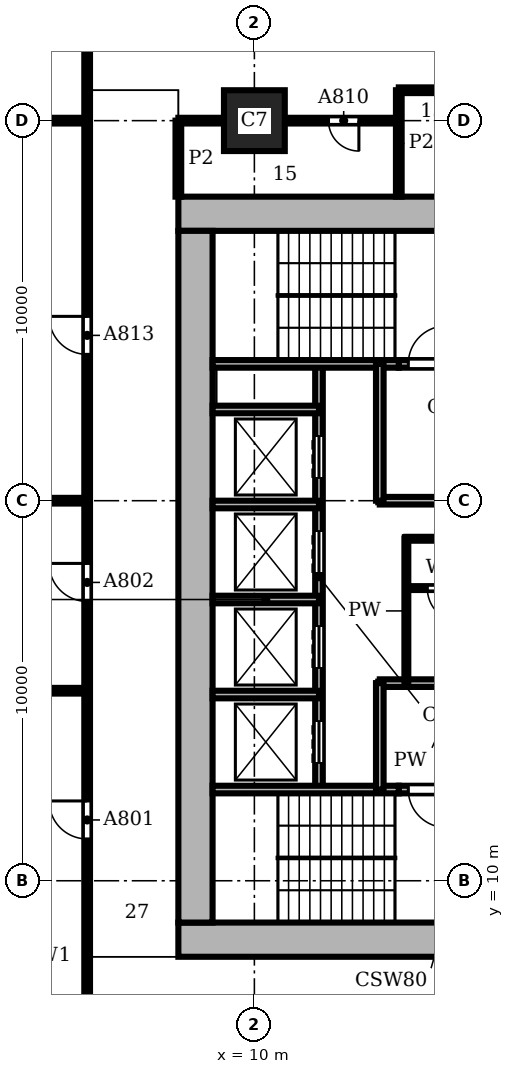
"""IFC4 building model, lengths in metres.
Left out: names, types, materials, properties, quantities, classifications, styles, units other than length and angle.
Written with IfcOpenShell. Run it as: python <this file> out.ifc"""

import sys

from ifc_helpers import new_model, si_unit, direction, frame, frame_2d, origin, origin_2d, place, context, subcontext, project, spatial, rectangle, extrude, element, fill, save


model = new_model("IFC4")
c1 = context("Model", 3, precision=1e-05, world=origin(), true_north=direction((0.0, 1.0)))
c2 = subcontext(c1, "Body", "Model", "MODEL_VIEW")
j1 = project(units=[si_unit("LENGTHUNIT", "METRE"), si_unit("PLANEANGLEUNIT", "RADIAN")], contexts=[c1])
p1 = place(None, origin())
s1 = spatial("IfcSite", under=j1, at=p1, CompositionType="ELEMENT")
p2 = place(p1, origin())
s2 = spatial("IfcBuilding", under=s1, at=p2, CompositionType="ELEMENT")
p3 = place(p2, frame((0.0, 0.0, 93.9)))
s3 = spatial("IfcBuildingStorey", under=s2, at=p3, CompositionType="ELEMENT", Elevation=93.9)
p4 = place(p3, frame((10.0, 30.0, 0.0), z_axis=(0.0, 0.0, 1.0), x_axis=(1.0, 0.0, 0.0)))
e1 = element("IfcColumn", 1, at=p4, inside=s3, PredefinedType="COLUMN", context=c2, shape_type="SweptSolid", body=[
    extrude(rectangle(XDim=1.6, YDim=1.6, at=origin_2d()), origin(), (0.0, 0.0, 1.0), 3.9),
])
for number, where, z_axis, x_axis in (
    (2, (8.0, 8.45, 0.0), (0.0, 0.0, 1.0), (1.0, 0.0, 0.0)),
    (3, (28.0, 27.55, 0.0), (0.0, 0.0, 1.0), (-1.0, 0.0, 0.0)),
):
    element("IfcWall", number, at=place(p3, frame(where, z_axis=z_axis, x_axis=x_axis)), inside=s3, PredefinedType="SHEAR", context=c2, shape_type="SweptSolid", body=[
        extrude(rectangle(XDim=20.0, YDim=0.9, at=frame_2d((10.0, 0.0))), origin(), (0.0, 0.0, 1.0), 3.9),
    ])
p5 = place(p3, frame((8.45, 27.1, 0.0), z_axis=(0.0, 0.0, 1.0), x_axis=(0.0, -1.0, 0.0)))
e4 = element("IfcWall", 4, at=p5, inside=s3, PredefinedType="SHEAR", context=c2, shape_type="SweptSolid", body=[
    extrude(rectangle(XDim=18.2, YDim=0.9, at=frame_2d((9.1, 0.0))), origin(), (0.0, 0.0, 1.0), 3.9),
])
p6 = place(p3, frame((2.532, 8.878, 0.0), z_axis=(0.0, 0.0, 1.0), x_axis=(0.608759824817, -0.793354571229, 0.0)))
e5 = element("IfcWall", 5, at=p6, inside=s3, PredefinedType="SOLIDWALL", context=c2, shape_type="SweptSolid", body=[
    extrude(rectangle(XDim=4.121, YDim=0.4, at=frame_2d((2.061, 0.0))), origin(), (0.0, 0.0, 1.0), 3.9),
])
p7 = place(p6, frame((1.611, 0.0, 0.9)))
e6 = element("IfcOpeningElement", 6, at=p7, cuts=e5, PredefinedType="OPENING", context=c2, shape_type="SweptSolid", body=[
    extrude(rectangle(XDim=0.9, YDim=2.35, at=frame_2d((0.45, 1.175))), frame((0.0, 0.21, 0.0), z_axis=(0.0, -1.0, 0.0), x_axis=(1.0, 0.0, 0.0)), (0.0, 0.0, 1.0), 0.42),
])
p8 = place(p3, frame((8.9, 12.4, 0.0), z_axis=(0.0, 0.0, 1.0), x_axis=(1.0, 0.0, 0.0)))
e7 = element("IfcWall", 7, at=p8, inside=s3, PredefinedType="SHEAR", context=c2, shape_type="SweptSolid", body=[
    extrude(rectangle(XDim=4.9, YDim=0.2, at=frame_2d((2.45, 0.0))), origin(), (0.0, 0.0, 1.0), 3.58),
])
p9 = place(p3, frame((13.8, 12.4, 0.0), z_axis=(0.0, 0.0, 1.0), x_axis=(1.0, 0.0, 0.0)))
e8 = element("IfcWall", 8, at=p9, inside=s3, PredefinedType="SHEAR", context=c2, shape_type="SweptSolid", body=[
    extrude(rectangle(XDim=13.3, YDim=0.2, at=frame_2d((6.65, 0.0))), origin(), (0.0, 0.0, 1.0), 3.58),
])
p10 = place(p9, frame((2.4, 0.0, 0.0)))
e9 = element("IfcOpeningElement", 9, at=p10, cuts=e8, PredefinedType="OPENING", context=c2, shape_type="SweptSolid", body=[
    extrude(rectangle(XDim=1.1, YDim=2.1, at=frame_2d((0.55, 1.05))), frame((0.0, 0.11, 0.0), z_axis=(0.0, -1.0, 0.0), x_axis=(1.0, 0.0, 0.0)), (0.0, 0.0, 1.0), 0.22),
])
p11 = place(p9, frame((4.9, 0.0, 0.0)))
e10 = element("IfcOpeningElement", 10, at=p11, cuts=e8, PredefinedType="OPENING", context=c2, shape_type="SweptSolid", body=[
    extrude(rectangle(XDim=1.1, YDim=2.1, at=frame_2d((0.55, 1.05))), frame((0.0, 0.11, 0.0), z_axis=(0.0, -1.0, 0.0), x_axis=(1.0, 0.0, 0.0)), (0.0, 0.0, 1.0), 0.22),
])
p12 = place(p9, frame((0.25, 0.0, 0.0)))
e11 = element("IfcOpeningElement", 11, at=p12, cuts=e8, PredefinedType="OPENING", context=c2, shape_type="SweptSolid", body=[
    extrude(rectangle(XDim=1.0, YDim=2.1, at=frame_2d((0.5, 1.05))), frame((0.0, 0.11, 0.0), z_axis=(0.0, -1.0, 0.0), x_axis=(1.0, 0.0, 0.0)), (0.0, 0.0, 1.0), 0.22),
])
p13 = place(p3, frame((8.9, 14.9, 0.0), z_axis=(0.0, 0.0, 1.0), x_axis=(1.0, 0.0, 0.0)))
e12 = element("IfcWall", 12, at=p13, inside=s3, PredefinedType="SHEAR", context=c2, shape_type="SweptSolid", body=[
    extrude(rectangle(XDim=2.8, YDim=0.2, at=frame_2d((1.4, 0.0))), origin(), (0.0, 0.0, 1.0), 3.58),
])
p14 = place(p3, frame((13.3, 15.2, 0.0), z_axis=(0.0, 0.0, 1.0), x_axis=(1.0, 0.0, 0.0)))
e13 = element("IfcWall", 13, at=p14, inside=s3, PredefinedType="SHEAR", context=c2, shape_type="SweptSolid", body=[
    extrude(rectangle(XDim=9.7, YDim=0.2, at=frame_2d((4.85, 0.0))), origin(), (0.0, 0.0, 1.0), 3.58),
])
p15 = place(p3, frame((8.9, 17.4, 0.0), z_axis=(0.0, 0.0, 1.0), x_axis=(1.0, 0.0, 0.0)))
e14 = element("IfcWall", 14, at=p15, inside=s3, PredefinedType="SHEAR", context=c2, shape_type="SweptSolid", body=[
    extrude(rectangle(XDim=2.8, YDim=0.2, at=frame_2d((1.4, 0.0))), origin(), (0.0, 0.0, 1.0), 3.58),
])
p16 = place(p3, frame((14.0, 17.7, 0.0), z_axis=(0.0, 0.0, 1.0), x_axis=(1.0, 0.0, 0.0)))
e15 = element("IfcWall", 15, at=p16, inside=s3, PredefinedType="PARTITIONING", context=c2, shape_type="SweptSolid", body=[
    extrude(rectangle(XDim=6.8, YDim=0.1, at=frame_2d((3.4, 0.0))), origin(), (0.0, 0.0, 1.0), 3.58),
])
p17 = place(p16, frame((0.55, 0.0, 0.0)))
e16 = element("IfcOpeningElement", 16, at=p17, cuts=e15, PredefinedType="OPENING", context=c2, shape_type="SweptSolid", body=[
    extrude(rectangle(XDim=0.9, YDim=2.1, at=frame_2d((0.45, 1.05))), frame((0.0, 0.06, 0.0), z_axis=(0.0, -1.0, 0.0), x_axis=(1.0, 0.0, 0.0)), (0.0, 0.0, 1.0), 0.12),
])
p18 = place(p16, frame((2.55, 0.0, 0.0)))
e17 = element("IfcOpeningElement", 17, at=p18, cuts=e15, PredefinedType="OPENING", context=c2, shape_type="SweptSolid", body=[
    extrude(rectangle(XDim=0.9, YDim=2.1, at=frame_2d((0.45, 1.05))), frame((0.0, 0.06, 0.0), z_axis=(0.0, -1.0, 0.0), x_axis=(1.0, 0.0, 0.0)), (0.0, 0.0, 1.0), 0.12),
])
p19 = place(p16, frame((4.45, 0.0, 0.0)))
e18 = element("IfcOpeningElement", 18, at=p19, cuts=e15, PredefinedType="OPENING", context=c2, shape_type="SweptSolid", body=[
    extrude(rectangle(XDim=0.9, YDim=2.1, at=frame_2d((0.45, 1.05))), frame((0.0, 0.06, 0.0), z_axis=(0.0, -1.0, 0.0), x_axis=(1.0, 0.0, 0.0)), (0.0, 0.0, 1.0), 0.12),
])
p20 = place(p16, frame((5.95, 0.0, 0.0)))
e19 = element("IfcOpeningElement", 19, at=p20, cuts=e15, PredefinedType="OPENING", context=c2, shape_type="SweptSolid", body=[
    extrude(rectangle(XDim=0.7, YDim=2.1, at=frame_2d((0.35, 1.05))), frame((0.0, 0.06, 0.0), z_axis=(0.0, -1.0, 0.0), x_axis=(1.0, 0.0, 0.0)), (0.0, 0.0, 1.0), 0.12),
])
p21 = place(p3, frame((14.0, 19.0, 0.0), z_axis=(0.0, 0.0, 1.0), x_axis=(1.0, 0.0, 0.0)))
e20 = element("IfcWall", 20, at=p21, inside=s3, PredefinedType="PARTITIONING", context=c2, shape_type="SweptSolid", body=[
    extrude(rectangle(XDim=8.0, YDim=0.1, at=frame_2d((4.0, 0.0))), origin(), (0.0, 0.0, 1.0), 3.58),
])
p22 = place(p21, frame((5.45, 0.0, 0.0)))
e21 = element("IfcOpeningElement", 21, at=p22, cuts=e20, PredefinedType="OPENING", context=c2, shape_type="SweptSolid", body=[
    extrude(rectangle(XDim=1.1, YDim=2.1, at=frame_2d((0.55, 1.05))), frame((0.0, 0.06, 0.0), z_axis=(0.0, -1.0, 0.0), x_axis=(1.0, 0.0, 0.0)), (0.0, 0.0, 1.0), 0.12),
])
p23 = place(p3, frame((8.9, 19.9, 0.0), z_axis=(0.0, 0.0, 1.0), x_axis=(1.0, 0.0, 0.0)))
e22 = element("IfcWall", 22, at=p23, inside=s3, PredefinedType="SHEAR", context=c2, shape_type="SweptSolid", body=[
    extrude(rectangle(XDim=2.8, YDim=0.2, at=frame_2d((1.4, 0.0))), origin(), (0.0, 0.0, 1.0), 3.58),
])
p24 = place(p3, frame((13.3, 20.0, 0.0), z_axis=(0.0, 0.0, 1.0), x_axis=(1.0, 0.0, 0.0)))
e23 = element("IfcWall", 23, at=p24, inside=s3, PredefinedType="SHEAR", context=c2, shape_type="SweptSolid", body=[
    extrude(rectangle(XDim=4.7, YDim=0.2, at=frame_2d((2.35, 0.0))), origin(), (0.0, 0.0, 1.0), 3.58),
])
p25 = place(p3, frame((8.9, 22.4, 0.0), z_axis=(0.0, 0.0, 1.0), x_axis=(1.0, 0.0, 0.0)))
e24 = element("IfcWall", 24, at=p25, inside=s3, PredefinedType="SHEAR", context=c2, shape_type="SweptSolid", body=[
    extrude(rectangle(XDim=2.8, YDim=0.2, at=frame_2d((1.4, 0.0))), origin(), (0.0, 0.0, 1.0), 3.58),
])
p26 = place(p3, frame((8.9, 23.6, 0.0), z_axis=(0.0, 0.0, 1.0), x_axis=(1.0, 0.0, 0.0)))
e25 = element("IfcWall", 25, at=p26, inside=s3, PredefinedType="SHEAR", context=c2, shape_type="SweptSolid", body=[
    extrude(rectangle(XDim=4.9, YDim=0.2, at=frame_2d((2.45, 0.0))), origin(), (0.0, 0.0, 1.0), 3.58),
])
p27 = place(p3, frame((13.8, 23.6, 0.0), z_axis=(0.0, 0.0, 1.0), x_axis=(1.0, 0.0, 0.0)))
e26 = element("IfcWall", 26, at=p27, inside=s3, PredefinedType="SHEAR", context=c2, shape_type="SweptSolid", body=[
    extrude(rectangle(XDim=13.3, YDim=0.2, at=frame_2d((6.65, 0.0))), origin(), (0.0, 0.0, 1.0), 3.58),
])
p28 = place(p27, frame((2.4, 0.0, 0.0)))
e27 = element("IfcOpeningElement", 27, at=p28, cuts=e26, PredefinedType="OPENING", context=c2, shape_type="SweptSolid", body=[
    extrude(rectangle(XDim=1.1, YDim=2.1, at=frame_2d((0.55, 1.05))), frame((0.0, 0.11, 0.0), z_axis=(0.0, -1.0, 0.0), x_axis=(1.0, 0.0, 0.0)), (0.0, 0.0, 1.0), 0.22),
])
p29 = place(p27, frame((4.9, 0.0, 0.0)))
e28 = element("IfcOpeningElement", 28, at=p29, cuts=e26, PredefinedType="OPENING", context=c2, shape_type="SweptSolid", body=[
    extrude(rectangle(XDim=1.1, YDim=2.1, at=frame_2d((0.55, 1.05))), frame((0.0, 0.11, 0.0), z_axis=(0.0, -1.0, 0.0), x_axis=(1.0, 0.0, 0.0)), (0.0, 0.0, 1.0), 0.22),
])
p30 = place(p27, frame((0.25, 0.0, 0.0)))
e29 = element("IfcOpeningElement", 29, at=p30, cuts=e26, PredefinedType="OPENING", context=c2, shape_type="SweptSolid", body=[
    extrude(rectangle(XDim=1.0, YDim=2.1, at=frame_2d((0.5, 1.05))), frame((0.0, 0.11, 0.0), z_axis=(0.0, -1.0, 0.0), x_axis=(1.0, 0.0, 0.0)), (0.0, 0.0, 1.0), 0.22),
])
p31 = place(p3, frame((11.7, 12.4, 0.0), z_axis=(0.0, 0.0, 1.0), x_axis=(0.0, 1.0, 0.0)))
e30 = element("IfcWall", 30, at=p31, inside=s3, PredefinedType="SHEAR", context=c2, shape_type="SweptSolid", body=[
    extrude(rectangle(XDim=11.2, YDim=0.2, at=frame_2d((5.6, 0.0))), origin(), (0.0, 0.0, 1.0), 3.58),
])
p32 = place(p31, frame((0.7, 0.0, 0.0)))
e31 = element("IfcOpeningElement", 31, at=p32, cuts=e30, PredefinedType="OPENING", context=c2, shape_type="SweptSolid", body=[
    extrude(rectangle(XDim=1.1, YDim=2.1, at=frame_2d((0.55, 1.05))), frame((0.0, 0.11, 0.0), z_axis=(0.0, -1.0, 0.0), x_axis=(1.0, 0.0, 0.0)), (0.0, 0.0, 1.0), 0.22),
])
p33 = place(p31, frame((3.2, 0.0, 0.0)))
e32 = element("IfcOpeningElement", 32, at=p33, cuts=e30, PredefinedType="OPENING", context=c2, shape_type="SweptSolid", body=[
    extrude(rectangle(XDim=1.1, YDim=2.1, at=frame_2d((0.55, 1.05))), frame((0.0, 0.11, 0.0), z_axis=(0.0, -1.0, 0.0), x_axis=(1.0, 0.0, 0.0)), (0.0, 0.0, 1.0), 0.22),
])
p34 = place(p31, frame((5.7, 0.0, 0.0)))
e33 = element("IfcOpeningElement", 33, at=p34, cuts=e30, PredefinedType="OPENING", context=c2, shape_type="SweptSolid", body=[
    extrude(rectangle(XDim=1.1, YDim=2.1, at=frame_2d((0.55, 1.05))), frame((0.0, 0.11, 0.0), z_axis=(0.0, -1.0, 0.0), x_axis=(1.0, 0.0, 0.0)), (0.0, 0.0, 1.0), 0.22),
])
p35 = place(p31, frame((8.2, 0.0, 0.0)))
e34 = element("IfcOpeningElement", 34, at=p35, cuts=e30, PredefinedType="OPENING", context=c2, shape_type="SweptSolid", body=[
    extrude(rectangle(XDim=1.1, YDim=2.1, at=frame_2d((0.55, 1.05))), frame((0.0, 0.11, 0.0), z_axis=(0.0, -1.0, 0.0), x_axis=(1.0, 0.0, 0.0)), (0.0, 0.0, 1.0), 0.22),
])
p36 = place(p3, frame((13.3, 12.4, 0.0), z_axis=(0.0, 0.0, 1.0), x_axis=(0.0, 1.0, 0.0)))
e35 = element("IfcWall", 35, at=p36, inside=s3, PredefinedType="SHEAR", context=c2, shape_type="SweptSolid", body=[
    extrude(rectangle(XDim=2.8, YDim=0.2, at=frame_2d((1.4, 0.0))), origin(), (0.0, 0.0, 1.0), 3.58),
])
p37 = place(p3, frame((13.3, 20.0, 0.0), z_axis=(0.0, 0.0, 1.0), x_axis=(0.0, 1.0, 0.0)))
e36 = element("IfcWall", 36, at=p37, inside=s3, PredefinedType="SHEAR", context=c2, shape_type="SweptSolid", body=[
    extrude(rectangle(XDim=3.6, YDim=0.2, at=frame_2d((1.8, 0.0))), origin(), (0.0, 0.0, 1.0), 3.58),
])
p38 = place(p3, frame((14.0, 15.2, 0.0), z_axis=(0.0, 0.0, 1.0), x_axis=(0.0, 1.0, 0.0)))
e37 = element("IfcWall", 37, at=p38, inside=s3, PredefinedType="PARTITIONING", context=c2, shape_type="SweptSolid", body=[
    extrude(rectangle(XDim=3.8, YDim=0.1, at=frame_2d((1.9, 0.0))), origin(), (0.0, 0.0, 1.0), 3.58),
])
p39 = place(p3, frame((5.6, 5.6, 0.0), z_axis=(0.0, 0.0, 1.0), x_axis=(0.0, 1.0, 0.0)))
e38 = element("IfcWall", 38, at=p39, inside=s3, PredefinedType="PARTITIONING", context=c2, shape_type="SweptSolid", body=[
    extrude(rectangle(XDim=54.4, YDim=0.15, at=frame_2d((27.2, 0.0))), origin(), (0.0, 0.0, 1.0), 3.58),
])
p40 = place(p39, frame((5.5, 0.0, 0.0)))
e39 = element("IfcOpeningElement", 39, at=p40, cuts=e38, PredefinedType="OPENING", context=c2, shape_type="SweptSolid", body=[
    extrude(rectangle(XDim=1.0, YDim=2.1, at=frame_2d((0.5, 1.05))), frame((0.0, 0.085, 0.0), z_axis=(0.0, -1.0, 0.0), x_axis=(1.0, 0.0, 0.0)), (0.0, 0.0, 1.0), 0.17),
])
p41 = place(p39, frame((11.75, 0.0, 0.0)))
e40 = element("IfcOpeningElement", 40, at=p41, cuts=e38, PredefinedType="OPENING", context=c2, shape_type="SweptSolid", body=[
    extrude(rectangle(XDim=1.0, YDim=2.1, at=frame_2d((0.5, 1.05))), frame((0.0, 0.085, 0.0), z_axis=(0.0, -1.0, 0.0), x_axis=(1.0, 0.0, 0.0)), (0.0, 0.0, 1.0), 0.17),
])
p42 = place(p39, frame((18.25, 0.0, 0.0)))
e41 = element("IfcOpeningElement", 41, at=p42, cuts=e38, PredefinedType="OPENING", context=c2, shape_type="SweptSolid", body=[
    extrude(rectangle(XDim=1.0, YDim=2.1, at=frame_2d((0.5, 1.05))), frame((0.0, 0.085, 0.0), z_axis=(0.0, -1.0, 0.0), x_axis=(1.0, 0.0, 0.0)), (0.0, 0.0, 1.0), 0.17),
])
p43 = place(p39, frame((29.3, 0.0, 0.0)))
e42 = element("IfcOpeningElement", 42, at=p43, cuts=e38, PredefinedType="OPENING", context=c2, shape_type="SweptSolid", body=[
    extrude(rectangle(XDim=1.0, YDim=2.1, at=frame_2d((0.5, 1.05))), frame((0.0, 0.085, 0.0), z_axis=(0.0, -1.0, 0.0), x_axis=(1.0, 0.0, 0.0)), (0.0, 0.0, 1.0), 0.17),
])
p44 = place(p39, frame((39.75, 0.0, 0.0)))
e43 = element("IfcOpeningElement", 43, at=p44, cuts=e38, PredefinedType="OPENING", context=c2, shape_type="SweptSolid", body=[
    extrude(rectangle(XDim=1.0, YDim=2.1, at=frame_2d((0.5, 1.05))), frame((0.0, 0.085, 0.0), z_axis=(0.0, -1.0, 0.0), x_axis=(1.0, 0.0, 0.0)), (0.0, 0.0, 1.0), 0.17),
])
p45 = place(p39, frame((50.0, 0.0, 0.0)))
e44 = element("IfcOpeningElement", 44, at=p45, cuts=e38, PredefinedType="OPENING", context=c2, shape_type="SweptSolid", body=[
    extrude(rectangle(XDim=1.0, YDim=2.1, at=frame_2d((0.5, 1.05))), frame((0.0, 0.085, 0.0), z_axis=(0.0, -1.0, 0.0), x_axis=(1.0, 0.0, 0.0)), (0.0, 0.0, 1.0), 0.17),
])
p46 = place(p3, frame((8.0, 28.0, 0.0), z_axis=(0.0, 0.0, 1.0), x_axis=(0.0, 1.0, 0.0)))
e45 = element("IfcWall", 45, at=p46, inside=s3, PredefinedType="PARTITIONING", context=c2, shape_type="SweptSolid", body=[
    extrude(rectangle(XDim=2.0, YDim=0.15, at=frame_2d((1.0, 0.0))), origin(), (0.0, 0.0, 1.0), 3.58),
])
p47 = place(p3, frame((13.8, 28.0, 0.0), z_axis=(0.0, 0.0, 1.0), x_axis=(0.0, 1.0, 0.0)))
e46 = element("IfcWall", 46, at=p47, inside=s3, PredefinedType="PARTITIONING", context=c2, shape_type="SweptSolid", body=[
    extrude(rectangle(XDim=2.8, YDim=0.15, at=frame_2d((1.4, 0.0))), origin(), (0.0, 0.0, 1.0), 3.58),
])
p48 = place(p3, frame((0.063, 15.0, 0.0), z_axis=(0.0, 0.0, 1.0), x_axis=(1.0, 0.0, 0.0)))
e47 = element("IfcWall", 47, at=p48, inside=s3, PredefinedType="PARTITIONING", context=c2, shape_type="SweptSolid", body=[
    extrude(rectangle(XDim=5.537, YDim=0.15, at=frame_2d((2.769, 0.0))), origin(), (0.0, 0.0, 1.0), 3.58),
])
p49 = place(p3, frame((0.6, 20.0, 0.0), z_axis=(0.0, 0.0, 1.0), x_axis=(1.0, 0.0, 0.0)))
e48 = element("IfcWall", 48, at=p49, inside=s3, PredefinedType="PARTITIONING", context=c2, shape_type="SweptSolid", body=[
    extrude(rectangle(XDim=5.0, YDim=0.15, at=frame_2d((2.5, 0.0))), origin(), (0.0, 0.0, 1.0), 3.58),
])
p50 = place(p3, frame((0.5, 30.0, 0.0), z_axis=(0.0, 0.0, 1.0), x_axis=(1.0, 0.0, 0.0)))
e49 = element("IfcWall", 49, at=p50, inside=s3, PredefinedType="PARTITIONING", context=c2, shape_type="SweptSolid", body=[
    extrude(rectangle(XDim=5.1, YDim=0.15, at=frame_2d((2.55, 0.0))), origin(), (0.0, 0.0, 1.0), 3.58),
])
p51 = place(p3, frame((8.0, 30.0, 0.0), z_axis=(0.0, 0.0, 1.0), x_axis=(1.0, 0.0, 0.0)))
e50 = element("IfcWall", 50, at=p51, inside=s3, PredefinedType="PARTITIONING", context=c2, shape_type="SweptSolid", body=[
    extrude(rectangle(XDim=1.2, YDim=0.15, at=frame_2d((0.6, 0.0))), origin(), (0.0, 0.0, 1.0), 3.58),
])
p52 = place(p3, frame((10.8, 30.0, 0.0), z_axis=(0.0, 0.0, 1.0), x_axis=(1.0, 0.0, 0.0)))
e51 = element("IfcWall", 51, at=p52, inside=s3, PredefinedType="PARTITIONING", context=c2, shape_type="SweptSolid", body=[
    extrude(rectangle(XDim=3.0, YDim=0.15, at=frame_2d((1.5, 0.0))), origin(), (0.0, 0.0, 1.0), 3.58),
])
p53 = place(p52, frame((1.15, 0.0, 0.0)))
e52 = element("IfcOpeningElement", 52, at=p53, cuts=e51, PredefinedType="OPENING", context=c2, shape_type="SweptSolid", body=[
    extrude(rectangle(XDim=0.8, YDim=2.1, at=frame_2d((0.4, 1.05))), frame((0.0, 0.085, 0.0), z_axis=(0.0, -1.0, 0.0), x_axis=(1.0, 0.0, 0.0)), (0.0, 0.0, 1.0), 0.17),
])
p54 = place(p3, frame((13.8, 30.8, 0.0), z_axis=(0.0, 0.0, 1.0), x_axis=(1.0, 0.0, 0.0)))
e53 = element("IfcWall", 53, at=p54, inside=s3, PredefinedType="PARTITIONING", context=c2, shape_type="SweptSolid", body=[
    extrude(rectangle(XDim=5.4, YDim=0.15, at=frame_2d((2.7, 0.0))), origin(), (0.0, 0.0, 1.0), 3.58),
])
p55 = place(p32, origin())
e54 = element("IfcDoor", 54, at=p55, inside=s3, OperationType="DOUBLE_DOOR_SLIDING", PredefinedType="DOOR", context=c2, shape_type="SweptSolid", body=[
    extrude(rectangle(XDim=1.1, YDim=2.1, at=frame_2d((0.55, 1.05))), frame((0.0, 0.025, 0.0), z_axis=(0.0, -1.0, 0.0), x_axis=(1.0, 0.0, 0.0)), (0.0, 0.0, 1.0), 0.05),
])
fill(e31, e54)
p56 = place(p33, origin())
e55 = element("IfcDoor", 55, at=p56, inside=s3, OperationType="DOUBLE_DOOR_SLIDING", PredefinedType="DOOR", context=c2, shape_type="SweptSolid", body=[
    extrude(rectangle(XDim=1.1, YDim=2.1, at=frame_2d((0.55, 1.05))), frame((0.0, 0.025, 0.0), z_axis=(0.0, -1.0, 0.0), x_axis=(1.0, 0.0, 0.0)), (0.0, 0.0, 1.0), 0.05),
])
fill(e32, e55)
p57 = place(p34, origin())
e56 = element("IfcDoor", 56, at=p57, inside=s3, OperationType="DOUBLE_DOOR_SLIDING", PredefinedType="DOOR", context=c2, shape_type="SweptSolid", body=[
    extrude(rectangle(XDim=1.1, YDim=2.1, at=frame_2d((0.55, 1.05))), frame((0.0, 0.025, 0.0), z_axis=(0.0, -1.0, 0.0), x_axis=(1.0, 0.0, 0.0)), (0.0, 0.0, 1.0), 0.05),
])
fill(e33, e56)
p58 = place(p35, origin())
e57 = element("IfcDoor", 57, at=p58, inside=s3, OperationType="DOUBLE_DOOR_SLIDING", PredefinedType="DOOR", context=c2, shape_type="SweptSolid", body=[
    extrude(rectangle(XDim=1.1, YDim=2.1, at=frame_2d((0.55, 1.05))), frame((0.0, 0.025, 0.0), z_axis=(0.0, -1.0, 0.0), x_axis=(1.0, 0.0, 0.0)), (0.0, 0.0, 1.0), 0.05),
])
fill(e34, e57)
p59 = place(p12, frame((1.0, 0.0, 0.0), z_axis=(0.0, 0.0, 1.0), x_axis=(-1.0, 0.0, 0.0)))
e58 = element("IfcDoor", 58, at=p59, inside=s3, OperationType="SINGLE_SWING_LEFT", PredefinedType="DOOR", context=c2, shape_type="SweptSolid", body=[
    extrude(rectangle(XDim=1.0, YDim=2.1, at=frame_2d((0.5, 1.05))), frame((0.0, 0.025, 0.0), z_axis=(0.0, -1.0, 0.0), x_axis=(1.0, 0.0, 0.0)), (0.0, 0.0, 1.0), 0.05),
])
fill(e11, e58)
p60 = place(p30, origin())
e59 = element("IfcDoor", 59, at=p60, inside=s3, OperationType="SINGLE_SWING_RIGHT", PredefinedType="DOOR", context=c2, shape_type="SweptSolid", body=[
    extrude(rectangle(XDim=1.0, YDim=2.1, at=frame_2d((0.5, 1.05))), frame((0.0, 0.025, 0.0), z_axis=(0.0, -1.0, 0.0), x_axis=(1.0, 0.0, 0.0)), (0.0, 0.0, 1.0), 0.05),
])
fill(e29, e59)
p61 = place(p17, frame((0.9, 0.0, 0.0), z_axis=(0.0, 0.0, 1.0), x_axis=(-1.0, 0.0, 0.0)))
e60 = element("IfcDoor", 60, at=p61, inside=s3, OperationType="SINGLE_SWING_LEFT", PredefinedType="DOOR", context=c2, shape_type="SweptSolid", body=[
    extrude(rectangle(XDim=0.9, YDim=2.1, at=frame_2d((0.45, 1.05))), frame((0.0, 0.025, 0.0), z_axis=(0.0, -1.0, 0.0), x_axis=(1.0, 0.0, 0.0)), (0.0, 0.0, 1.0), 0.05),
])
fill(e16, e60)
p62 = place(p40, origin())
e61 = element("IfcDoor", 61, at=p62, inside=s3, OperationType="SINGLE_SWING_RIGHT", PredefinedType="DOOR", context=c2, shape_type="SweptSolid", body=[
    extrude(rectangle(XDim=1.0, YDim=2.1, at=frame_2d((0.5, 1.05))), frame((0.0, 0.025, 0.0), z_axis=(0.0, -1.0, 0.0), x_axis=(1.0, 0.0, 0.0)), (0.0, 0.0, 1.0), 0.05),
])
fill(e39, e61)
p63 = place(p41, origin())
e62 = element("IfcDoor", 62, at=p63, inside=s3, OperationType="SINGLE_SWING_RIGHT", PredefinedType="DOOR", context=c2, shape_type="SweptSolid", body=[
    extrude(rectangle(XDim=1.0, YDim=2.1, at=frame_2d((0.5, 1.05))), frame((0.0, 0.025, 0.0), z_axis=(0.0, -1.0, 0.0), x_axis=(1.0, 0.0, 0.0)), (0.0, 0.0, 1.0), 0.05),
])
fill(e40, e62)
p64 = place(p53, frame((0.8, 0.0, 0.0), z_axis=(0.0, 0.0, 1.0), x_axis=(-1.0, 0.0, 0.0)))
e63 = element("IfcDoor", 63, at=p64, inside=s3, OperationType="SINGLE_SWING_LEFT", PredefinedType="DOOR", context=c2, shape_type="SweptSolid", body=[
    extrude(rectangle(XDim=0.8, YDim=2.1, at=frame_2d((0.4, 1.05))), frame((0.0, 0.025, 0.0), z_axis=(0.0, -1.0, 0.0), x_axis=(1.0, 0.0, 0.0)), (0.0, 0.0, 1.0), 0.05),
])
fill(e52, e63)
p65 = place(p42, origin())
e64 = element("IfcDoor", 64, at=p65, inside=s3, OperationType="SINGLE_SWING_RIGHT", PredefinedType="DOOR", context=c2, shape_type="SweptSolid", body=[
    extrude(rectangle(XDim=1.0, YDim=2.1, at=frame_2d((0.5, 1.05))), frame((0.0, 0.025, 0.0), z_axis=(0.0, -1.0, 0.0), x_axis=(1.0, 0.0, 0.0)), (0.0, 0.0, 1.0), 0.05),
])
fill(e41, e64)
save(model, sys.argv[1])
